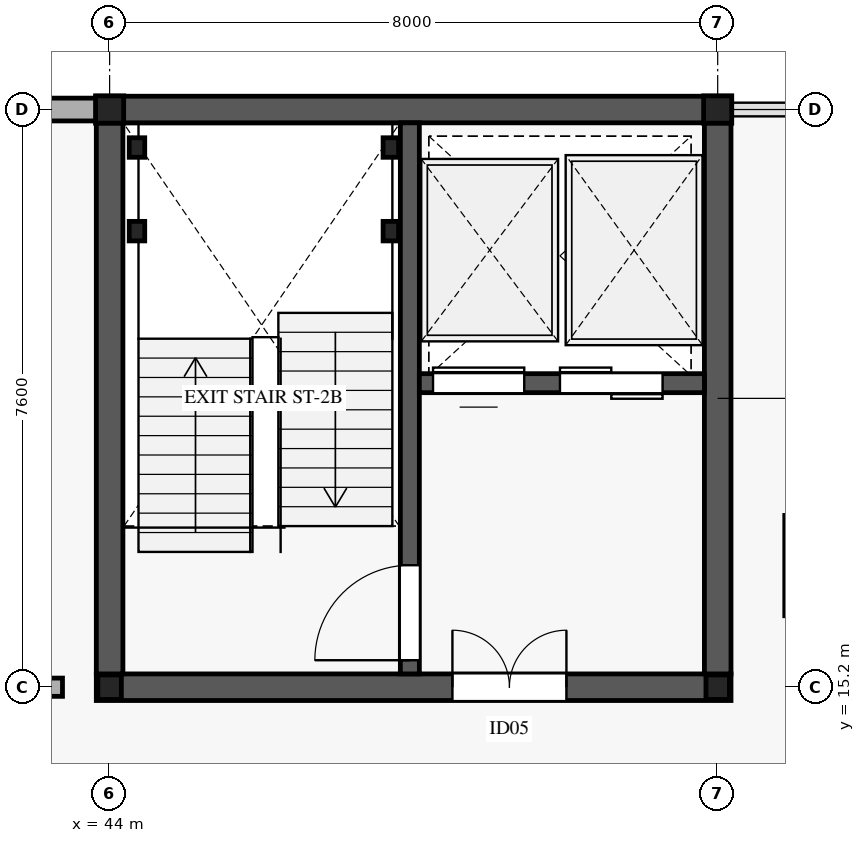
"""IFC4 building model, lengths in metres.
Left out: names, types, materials, properties, quantities, classifications, styles, units other than length and angle.
Written with IfcOpenShell. Run it as: python <this file> out.ifc"""

import sys

from ifc_helpers import new_model, si_unit, direction, frame, frame_2d, origin, origin_2d, place, context, subcontext, project, spatial, rectangle, i_section, extrude, element, fill, save


model = new_model("IFC4")
c1 = context("Model", 3, precision=1e-05, world=origin(), true_north=direction((0.0, 1.0)))
c2 = subcontext(c1, "Body", "Model", "MODEL_VIEW")
j1 = project(units=[si_unit("LENGTHUNIT", "METRE"), si_unit("PLANEANGLEUNIT", "RADIAN")], contexts=[c1])
p1 = place(None, origin())
s1 = spatial("IfcSite", under=j1, at=p1, CompositionType="ELEMENT")
p2 = place(p1, origin())
s2 = spatial("IfcBuilding", under=s1, at=p2, CompositionType="ELEMENT")
p3 = place(p2, frame((0.0, 0.0, 29.4)))
s3 = spatial("IfcBuildingStorey", under=s2, at=p3, CompositionType="ELEMENT", Elevation=29.4)
p4 = place(p3, frame((44.0, 15.2, 0.0), z_axis=(0.0, 0.0, 1.0), x_axis=(1.0, 0.0, 0.0)))
e1 = element("IfcColumn", 1, at=p4, inside=s3, PredefinedType="COLUMN", context=c2, shape_type="SweptSolid", body=[
    extrude(i_section(OverallWidth=0.309, OverallDepth=0.323, WebThickness=0.014, FlangeThickness=0.023, FilletRadius=0.015, at=origin_2d()), origin(), (0.0, 0.0, 1.0), 4.0),
])
p5 = place(p3, frame((44.0, 22.8, 0.0), z_axis=(0.0, 0.0, 1.0), x_axis=(1.0, 0.0, 0.0)))
e2 = element("IfcColumn", 2, at=p5, inside=s3, PredefinedType="COLUMN", context=c2, shape_type="SweptSolid", body=[
    extrude(i_section(OverallWidth=0.37, OverallDepth=0.36, WebThickness=0.012, FlangeThickness=0.02, FilletRadius=0.015, at=origin_2d()), origin(), (0.0, 0.0, 1.0), 4.0),
])
p6 = place(p3, frame((52.0, 15.2, 0.0), z_axis=(0.0, 0.0, 1.0), x_axis=(1.0, 0.0, 0.0)))
e3 = element("IfcColumn", 3, at=p6, inside=s3, PredefinedType="COLUMN", context=c2, shape_type="SweptSolid", body=[
    extrude(i_section(OverallWidth=0.309, OverallDepth=0.323, WebThickness=0.014, FlangeThickness=0.023, FilletRadius=0.015, at=origin_2d()), origin(), (0.0, 0.0, 1.0), 4.0),
])
p7 = place(p3, frame((52.0, 22.8, 0.0), z_axis=(0.0, 0.0, 1.0), x_axis=(1.0, 0.0, 0.0)))
e4 = element("IfcColumn", 4, at=p7, inside=s3, PredefinedType="COLUMN", context=c2, shape_type="SweptSolid", body=[
    extrude(i_section(OverallWidth=0.37, OverallDepth=0.36, WebThickness=0.012, FlangeThickness=0.02, FilletRadius=0.015, at=origin_2d()), origin(), (0.0, 0.0, 1.0), 4.0),
])
p8 = place(p3, frame((35.98, 22.8, 0.0), z_axis=(0.0, 0.0, 1.0), x_axis=(1.0, 0.0, 0.0)))
e5 = element("IfcWall", 5, at=p8, inside=s3, PredefinedType="STANDARD", context=c2, shape_type="SweptSolid", body=[
    extrude(rectangle(XDim=8.04, YDim=0.3, at=frame_2d((4.02, 0.0))), origin(), (0.0, 0.0, 1.0), 3.06),
])
p9 = place(p3, frame((52.94, 17.46, 0.0), z_axis=(0.0, 0.0, 1.0), x_axis=(0.0, -1.0, 0.0)))
e6 = element("IfcWall", 6, at=p9, inside=s3, PredefinedType="PARTITIONING", context=c2, shape_type="SweptSolid", body=[
    extrude(rectangle(XDim=1.32, YDim=0.115, at=frame_2d((0.66, 0.0))), origin(), (0.0, 0.0, 1.0), 3.15),
])
p10 = place(p3, frame((43.825, 15.2, 0.0), z_axis=(0.0, 0.0, 1.0), x_axis=(1.0, 0.0, 0.0)))
e7 = element("IfcWall", 7, at=p10, inside=s3, PredefinedType="SHEAR", context=c2, shape_type="SweptSolid", body=[
    extrude(rectangle(XDim=8.35, YDim=0.35, at=frame_2d((4.175, 0.0))), origin(), (0.0, 0.0, 1.0), 3.99),
])
p11 = place(p10, frame((4.685, 0.0, 0.0)))
e8 = element("IfcOpeningElement", 8, at=p11, cuts=e7, PredefinedType="OPENING", context=c2, shape_type="SweptSolid", body=[
    extrude(rectangle(XDim=1.5, YDim=2.2, at=frame_2d((0.75, 1.1))), frame((0.0, 0.185, 0.0), z_axis=(0.0, -1.0, 0.0), x_axis=(1.0, 0.0, 0.0)), (0.0, 0.0, 1.0), 0.37),
])
p12 = place(p3, frame((43.825, 22.8, 0.0), z_axis=(0.0, 0.0, 1.0), x_axis=(1.0, 0.0, 0.0)))
e9 = element("IfcWall", 9, at=p12, inside=s3, PredefinedType="SHEAR", context=c2, shape_type="SweptSolid", body=[
    extrude(rectangle(XDim=8.35, YDim=0.35, at=frame_2d((4.175, 0.0))), origin(), (0.0, 0.0, 1.0), 3.99),
])
for number, where, z_axis, x_axis in (
    (10, (44.0, 15.375, 0.0), (0.0, 0.0, 1.0), (0.0, 1.0, 0.0)),
    (11, (52.0, 15.375, 0.0), (0.0, 0.0, 1.0), (0.0, 1.0, 0.0)),
):
    element("IfcWall", number, at=place(p3, frame(where, z_axis=z_axis, x_axis=x_axis)), inside=s3, PredefinedType="SHEAR", context=c2, shape_type="SweptSolid", body=[
        extrude(rectangle(XDim=7.25, YDim=0.35, at=frame_2d((3.625, 0.0))), origin(), (0.0, 0.0, 1.0), 3.99),
    ])
p13 = place(p3, frame((47.95, 15.375, 0.0), z_axis=(0.0, 0.0, 1.0), x_axis=(0.0, 1.0, 0.0)))
e12 = element("IfcWall", 12, at=p13, inside=s3, PredefinedType="SHEAR", context=c2, shape_type="SweptSolid", body=[
    extrude(rectangle(XDim=7.25, YDim=0.25, at=frame_2d((3.625, 0.0))), origin(), (0.0, 0.0, 1.0), 3.99),
])
p14 = place(p13, frame((0.18, 0.0, 0.0)))
e13 = element("IfcOpeningElement", 13, at=p14, cuts=e12, PredefinedType="OPENING", context=c2, shape_type="SweptSolid", body=[
    extrude(rectangle(XDim=1.25, YDim=2.2, at=frame_2d((0.625, 1.1))), frame((0.0, 0.135, 0.0), z_axis=(0.0, -1.0, 0.0), x_axis=(1.0, 0.0, 0.0)), (0.0, 0.0, 1.0), 0.27),
])
p15 = place(p3, frame((48.075, 19.2, 0.0), z_axis=(0.0, 0.0, 1.0), x_axis=(1.0, 0.0, 0.0)))
e14 = element("IfcWall", 14, at=p15, inside=s3, PredefinedType="SHEAR", context=c2, shape_type="SweptSolid", body=[
    extrude(rectangle(XDim=3.75, YDim=0.25, at=frame_2d((1.875, 0.0))), origin(), (0.0, 0.0, 1.0), 3.99),
])
p16 = place(p15, frame((0.18, 0.0, 0.0)))
e15 = element("IfcOpeningElement", 15, at=p16, cuts=e14, PredefinedType="OPENING", context=c2, shape_type="SweptSolid", body=[
    extrude(rectangle(XDim=1.2, YDim=2.2, at=frame_2d((0.6, 1.1))), frame((0.0, 0.135, 0.0), z_axis=(0.0, -1.0, 0.0), x_axis=(1.0, 0.0, 0.0)), (0.0, 0.0, 1.0), 0.27),
])
p17 = place(p15, frame((1.85, 0.0, 0.0)))
e16 = element("IfcOpeningElement", 16, at=p17, cuts=e14, PredefinedType="OPENING", context=c2, shape_type="SweptSolid", body=[
    extrude(rectangle(XDim=1.35, YDim=2.2, at=frame_2d((0.675, 1.1))), frame((0.0, 0.135, 0.0), z_axis=(0.0, -1.0, 0.0), x_axis=(1.0, 0.0, 0.0)), (0.0, 0.0, 1.0), 0.27),
])
for number, where, z_axis, x_axis in (
    (17, (44.36, 21.2, 0.0), (0.0, 0.0, 1.0), (1.0, 0.0, 0.0)),
    (18, (47.7, 21.2, 0.0), (0.0, 0.0, 1.0), (1.0, 0.0, 0.0)),
    (19, (44.36, 22.3, 0.0), (0.0, 0.0, 1.0), (1.0, 0.0, 0.0)),
    (20, (47.7, 22.3, 0.0), (0.0, 0.0, 1.0), (1.0, 0.0, 0.0)),
):
    element("IfcColumn", number, at=place(p3, frame(where, z_axis=z_axis, x_axis=x_axis)), inside=s3, PredefinedType="COLUMN", context=c2, shape_type="SweptSolid", body=[
        extrude(i_section(OverallWidth=0.204, OverallDepth=0.257, WebThickness=0.009, FlangeThickness=0.016, FilletRadius=0.013, at=origin_2d()), origin(), (0.0, 0.0, 1.0), 4.195),
    ])
p18 = place(p3, frame((36.22, 15.2, 0.0), z_axis=(0.0, 0.0, 1.0), x_axis=(1.0, 0.0, 0.0)))
e21 = element("IfcWall", 21, at=p18, inside=s3, PredefinedType="PARTITIONING", context=c2, shape_type="SweptSolid", body=[
    extrude(rectangle(XDim=7.16, YDim=0.24, at=frame_2d((3.58, 0.0))), origin(), (0.0, 0.0, 1.0), 2.85),
])
p19 = place(p18, frame((2.705, 0.0, 0.0)))
e22 = element("IfcOpeningElement", 22, at=p19, cuts=e21, PredefinedType="OPENING", context=c2, shape_type="SweptSolid", body=[
    extrude(rectangle(XDim=1.75, YDim=2.35, at=frame_2d((0.875, 1.175))), frame((0.0, 0.13, 0.0), z_axis=(0.0, -1.0, 0.0), x_axis=(1.0, 0.0, 0.0)), (0.0, 0.0, 1.0), 0.26),
])
p20 = place(p14, origin())
e23 = element("IfcDoor", 23, at=p20, inside=s3, OperationType="SINGLE_SWING_LEFT", PredefinedType="DOOR", context=c2, shape_type="SweptSolid", body=[
    extrude(rectangle(XDim=1.25, YDim=2.2, at=frame_2d((0.625, 1.1))), frame((0.0, 0.025, 0.0), z_axis=(0.0, -1.0, 0.0), x_axis=(1.0, 0.0, 0.0)), (0.0, 0.0, 1.0), 0.05),
])
fill(e13, e23)
p21 = place(p11, origin())
e24 = element("IfcDoor", 24, at=p21, inside=s3, OperationType="DOUBLE_DOOR_SINGLE_SWING", PredefinedType="DOOR", context=c2, shape_type="SweptSolid", body=[
    extrude(rectangle(XDim=1.5, YDim=2.2, at=frame_2d((0.75, 1.1))), frame((0.0, 0.025, 0.0), z_axis=(0.0, -1.0, 0.0), x_axis=(1.0, 0.0, 0.0)), (0.0, 0.0, 1.0), 0.05),
])
fill(e8, e24)
p22 = place(p16, origin())
e25 = element("IfcDoor", 25, at=p22, inside=s3, OperationType="SLIDING_TO_LEFT", PredefinedType="DOOR", context=c2, shape_type="SweptSolid", body=[
    extrude(rectangle(XDim=1.2, YDim=2.2, at=frame_2d((0.6, 1.1))), frame((0.0, 0.025, 0.0), z_axis=(0.0, -1.0, 0.0), x_axis=(1.0, 0.0, 0.0)), (0.0, 0.0, 1.0), 0.05),
])
fill(e15, e25)
p23 = place(p17, origin())
e26 = element("IfcDoor", 26, at=p23, inside=s3, OperationType="DOUBLE_DOOR_SLIDING", PredefinedType="DOOR", context=c2, shape_type="SweptSolid", body=[
    extrude(rectangle(XDim=1.35, YDim=2.2, at=frame_2d((0.675, 1.1))), frame((0.0, 0.025, 0.0), z_axis=(0.0, -1.0, 0.0), x_axis=(1.0, 0.0, 0.0)), (0.0, 0.0, 1.0), 0.05),
])
fill(e16, e26)
save(model, sys.argv[1])
